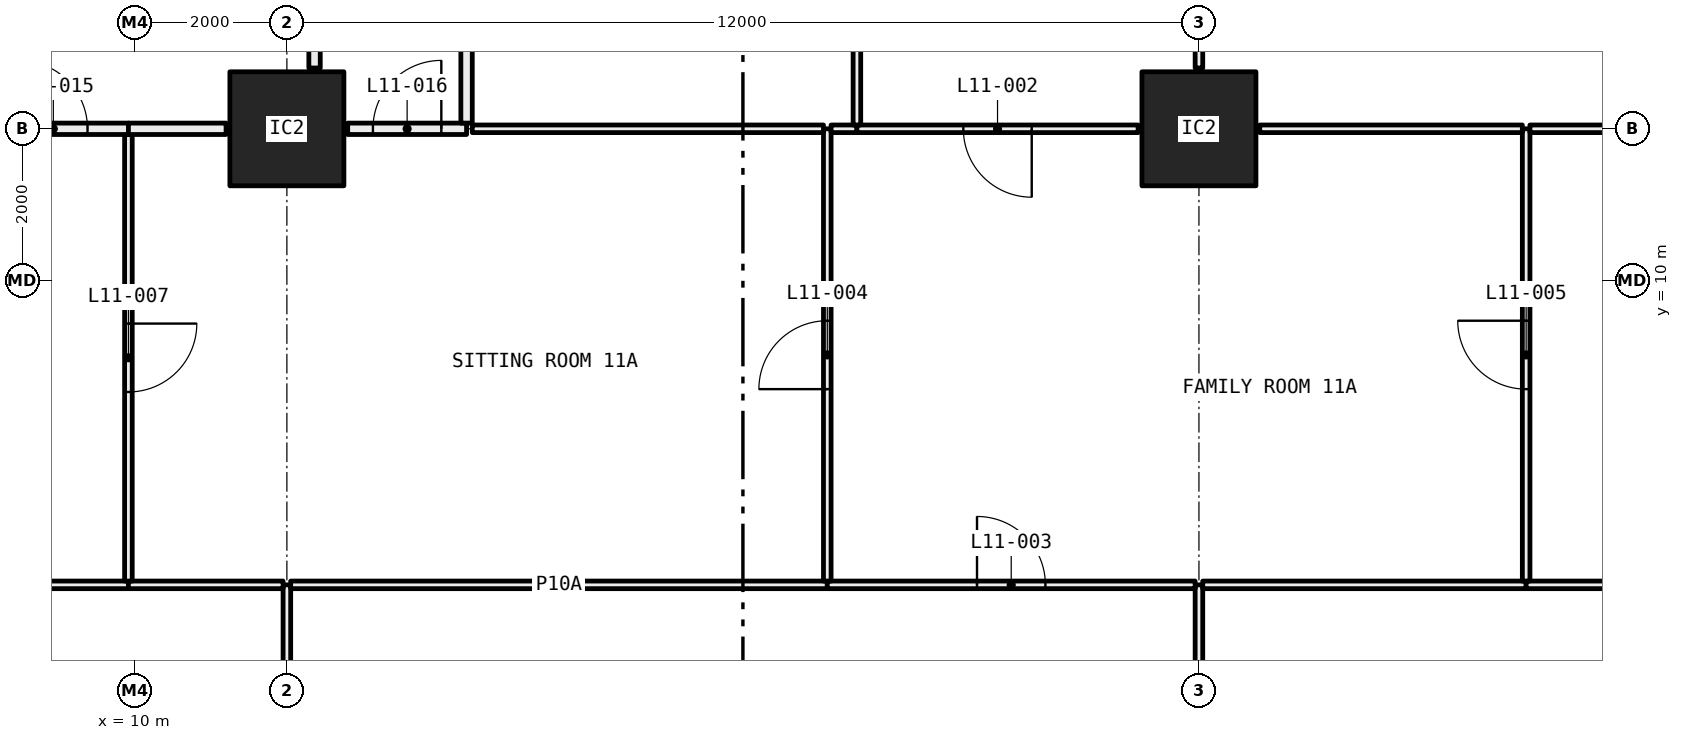
"""IFC4 building model, lengths in metres.
Left out: names, types, materials, properties, quantities, classifications, styles, units other than length and angle.
Written with IfcOpenShell. Run it as: python <this file> out.ifc"""

import sys

from ifc_helpers import new_model, si_unit, direction, frame, frame_2d, origin, origin_2d, place, context, subcontext, project, spatial, rectangle, hollow_rectangle, extrude, element, fill, save


model = new_model("IFC4")
c1 = context("Model", 3, precision=1e-05, world=origin(), true_north=direction((0.0, 1.0)))
c2 = subcontext(c1, "Body", "Model", "MODEL_VIEW")
j1 = project(units=[si_unit("LENGTHUNIT", "METRE"), si_unit("PLANEANGLEUNIT", "RADIAN")], contexts=[c1])
p1 = place(None, origin())
s1 = spatial("IfcSite", under=j1, at=p1, CompositionType="ELEMENT")
p2 = place(p1, origin())
s2 = spatial("IfcBuilding", under=s1, at=p2, CompositionType="ELEMENT")
p3 = place(p2, frame((0.0, 0.0, 50.7)))
s3 = spatial("IfcBuildingStorey", under=s2, at=p3, CompositionType="ELEMENT", Elevation=50.7)
for number, where, z_axis, x_axis in (
    (1, (12.0, 12.0, 0.0), (0.0, 0.0, 1.0), (1.0, 0.0, 0.0)),
    (2, (24.0, 12.0, 0.0), (0.0, 0.0, 1.0), (1.0, 0.0, 0.0)),
):
    element("IfcColumn", number, at=place(p3, frame(where, z_axis=z_axis, x_axis=x_axis)), inside=s3, PredefinedType="COLUMN", context=c2, shape_type="SweptSolid", body=[
        extrude(hollow_rectangle(XDim=1.5, YDim=1.5, WallThickness=0.065, at=origin_2d()), origin(), (0.0, 0.0, 1.0), 3.05),
    ])
p4 = place(p3, frame((12.0, 0.72, 0.0), z_axis=(0.0, 0.0, 1.0), x_axis=(0.0, 1.0, 0.0)))
e3 = element("IfcWall", 3, at=p4, inside=s3, PredefinedType="PARTITIONING", context=c2, shape_type="SweptSolid", body=[
    extrude(rectangle(XDim=5.28, YDim=0.1, at=frame_2d((2.64, 0.0))), origin(), (0.0, 0.0, 1.0), 2.45),
])
p5 = place(p4, frame((2.19, 0.0, 0.0)))
e4 = element("IfcOpeningElement", 4, at=p5, cuts=e3, PredefinedType="OPENING", context=c2, shape_type="SweptSolid", body=[
    extrude(rectangle(XDim=0.9, YDim=2.1, at=frame_2d((0.45, 1.05))), frame((0.0, 0.06, 0.0), z_axis=(0.0, -1.0, 0.0), x_axis=(1.0, 0.0, 0.0)), (0.0, 0.0, 1.0), 0.12),
])
p6 = place(p3, frame((9.915, 6.0, 0.0), z_axis=(0.0, 0.0, 1.0), x_axis=(-1.0, 0.0, 0.0)))
e5 = element("IfcWall", 5, at=p6, inside=s3, PredefinedType="PARTITIONING", context=c2, shape_type="SweptSolid", body=[
    extrude(rectangle(XDim=3.195, YDim=0.1, at=frame_2d((1.598, 0.0))), origin(), (0.0, 0.0, 1.0), 3.05),
])
p7 = place(p3, frame((11.95, 6.0, 0.0), z_axis=(0.0, 0.0, 1.0), x_axis=(-1.0, 0.0, 0.0)))
e6 = element("IfcWall", 6, at=p7, inside=s3, PredefinedType="PARTITIONING", context=c2, shape_type="SweptSolid", body=[
    extrude(rectangle(XDim=2.035, YDim=0.1, at=frame_2d((1.018, 0.0))), origin(), (0.0, 0.0, 1.0), 2.45),
])
p8 = place(p3, frame((24.0, 0.72, 0.0), z_axis=(0.0, 0.0, 1.0), x_axis=(0.0, 1.0, 0.0)))
e7 = element("IfcWall", 7, at=p8, inside=s3, PredefinedType="PARTITIONING", context=c2, shape_type="SweptSolid", body=[
    extrude(rectangle(XDim=5.28, YDim=0.1, at=frame_2d((2.64, 0.0))), origin(), (0.0, 0.0, 1.0), 2.45),
])
p9 = place(p8, frame((2.19, 0.0, 0.0)))
e8 = element("IfcOpeningElement", 8, at=p9, cuts=e7, PredefinedType="OPENING", context=c2, shape_type="SweptSolid", body=[
    extrude(rectangle(XDim=0.9, YDim=2.1, at=frame_2d((0.45, 1.05))), frame((0.0, 0.06, 0.0), z_axis=(0.0, -1.0, 0.0), x_axis=(1.0, 0.0, 0.0)), (0.0, 0.0, 1.0), 0.12),
])
p10 = place(p3, frame((19.11, 6.0, 0.0), z_axis=(0.0, 0.0, 1.0), x_axis=(-1.0, 0.0, 0.0)))
e9 = element("IfcWall", 9, at=p10, inside=s3, PredefinedType="PARTITIONING", context=c2, shape_type="SweptSolid", body=[
    extrude(rectangle(XDim=7.06, YDim=0.1, at=frame_2d((3.53, 0.0))), origin(), (0.0, 0.0, 1.0), 2.45),
])
p11 = place(p3, frame((23.95, 6.0, 0.0), z_axis=(0.0, 0.0, 1.0), x_axis=(-1.0, 0.0, 0.0)))
e10 = element("IfcWall", 10, at=p11, inside=s3, PredefinedType="PARTITIONING", context=c2, shape_type="SweptSolid", body=[
    extrude(rectangle(XDim=4.84, YDim=0.1, at=frame_2d((2.42, 0.0))), origin(), (0.0, 0.0, 1.0), 2.45),
])
p12 = place(p11, frame((1.97, 0.0, 0.0)))
e11 = element("IfcOpeningElement", 11, at=p12, cuts=e10, PredefinedType="OPENING", context=c2, shape_type="SweptSolid", body=[
    extrude(rectangle(XDim=0.9, YDim=2.1, at=frame_2d((0.45, 1.05))), frame((0.0, 0.06, 0.0), z_axis=(0.0, -1.0, 0.0), x_axis=(1.0, 0.0, 0.0)), (0.0, 0.0, 1.0), 0.12),
])
p13 = place(p3, frame((28.305, 6.0, 0.0), z_axis=(0.0, 0.0, 1.0), x_axis=(-1.0, 0.0, 0.0)))
e12 = element("IfcWall", 12, at=p13, inside=s3, PredefinedType="PARTITIONING", context=c2, shape_type="SweptSolid", body=[
    extrude(rectangle(XDim=4.255, YDim=0.1, at=frame_2d((2.127, 0.0))), origin(), (0.0, 0.0, 1.0), 2.45),
])
p14 = place(p3, frame((29.95, 6.0, 0.0), z_axis=(0.0, 0.0, 1.0), x_axis=(-1.0, 0.0, 0.0)))
e13 = element("IfcWall", 13, at=p14, inside=s3, PredefinedType="PARTITIONING", context=c2, shape_type="SweptSolid", body=[
    extrude(rectangle(XDim=1.645, YDim=0.1, at=frame_2d((0.823, 0.0))), origin(), (0.0, 0.0, 1.0), 3.05),
])
p15 = place(p3, frame((9.915, 6.05, 0.0), z_axis=(0.0, 0.0, 1.0), x_axis=(0.0, 1.0, 0.0)))
e14 = element("IfcWall", 14, at=p15, inside=s3, PredefinedType="PARTITIONING", context=c2, shape_type="SweptSolid", body=[
    extrude(rectangle(XDim=5.875, YDim=0.1, at=frame_2d((2.938, 0.0))), origin(), (0.0, 0.0, 1.0), 2.45),
])
p16 = place(p15, frame((2.488, 0.0, 0.0)))
e15 = element("IfcOpeningElement", 15, at=p16, cuts=e14, PredefinedType="OPENING", context=c2, shape_type="SweptSolid", body=[
    extrude(rectangle(XDim=0.9, YDim=2.1, at=frame_2d((0.45, 1.05))), frame((0.0, 0.06, 0.0), z_axis=(0.0, -1.0, 0.0), x_axis=(1.0, 0.0, 0.0)), (0.0, 0.0, 1.0), 0.12),
])
p17 = place(p3, frame((9.915, 12.0, 0.0), z_axis=(0.0, 0.0, 1.0), x_axis=(-1.0, 0.0, 0.0)))
e16 = element("IfcWall", 16, at=p17, inside=s3, PredefinedType="PARTITIONING", context=c2, shape_type="SweptSolid", body=[
    extrude(rectangle(XDim=1.976, YDim=0.15, at=frame_2d((0.988, 0.0))), origin(), (0.0, 0.0, 1.0), 2.45),
])
p18 = place(p17, frame((0.538, 0.0, 0.0)))
e17 = element("IfcOpeningElement", 17, at=p18, cuts=e16, PredefinedType="OPENING", context=c2, shape_type="SweptSolid", body=[
    extrude(rectangle(XDim=0.9, YDim=2.1, at=frame_2d((0.45, 1.05))), frame((0.0, 0.085, 0.0), z_axis=(0.0, -1.0, 0.0), x_axis=(1.0, 0.0, 0.0)), (0.0, 0.0, 1.0), 0.17),
])
p19 = place(p3, frame((19.11, 6.05, 0.0), z_axis=(0.0, 0.0, 1.0), x_axis=(0.0, 1.0, 0.0)))
e18 = element("IfcWall", 18, at=p19, inside=s3, PredefinedType="PARTITIONING", context=c2, shape_type="SweptSolid", body=[
    extrude(rectangle(XDim=5.95, YDim=0.1, at=frame_2d((2.975, 0.0))), origin(), (0.0, 0.0, 1.0), 2.45),
])
p20 = place(p19, frame((2.525, 0.0, 0.0)))
e19 = element("IfcOpeningElement", 19, at=p20, cuts=e18, PredefinedType="OPENING", context=c2, shape_type="SweptSolid", body=[
    extrude(rectangle(XDim=0.9, YDim=2.1, at=frame_2d((0.45, 1.05))), frame((0.0, 0.06, 0.0), z_axis=(0.0, -1.0, 0.0), x_axis=(1.0, 0.0, 0.0)), (0.0, 0.0, 1.0), 0.12),
])
p21 = place(p3, frame((11.2, 12.0, 0.0), z_axis=(0.0, 0.0, 1.0), x_axis=(-1.0, 0.0, 0.0)))
e20 = element("IfcWall", 20, at=p21, inside=s3, PredefinedType="PARTITIONING", context=c2, shape_type="SweptSolid", body=[
    extrude(rectangle(XDim=1.285, YDim=0.15, at=frame_2d((0.643, 0.0))), origin(), (0.0, 0.0, 1.0), 2.45),
])
p22 = place(p3, frame((14.364, 12.0, 0.0), z_axis=(0.0, 0.0, 1.0), x_axis=(-1.0, 0.0, 0.0)))
e21 = element("IfcWall", 21, at=p22, inside=s3, PredefinedType="PARTITIONING", context=c2, shape_type="SweptSolid", body=[
    extrude(rectangle(XDim=1.564, YDim=0.15, at=frame_2d((0.782, 0.0))), origin(), (0.0, 0.0, 1.0), 2.45),
])
p23 = place(p22, frame((0.332, 0.0, 0.0)))
e22 = element("IfcOpeningElement", 22, at=p23, cuts=e21, PredefinedType="OPENING", context=c2, shape_type="SweptSolid", body=[
    extrude(rectangle(XDim=0.9, YDim=2.1, at=frame_2d((0.45, 1.05))), frame((0.0, 0.085, 0.0), z_axis=(0.0, -1.0, 0.0), x_axis=(1.0, 0.0, 0.0)), (0.0, 0.0, 1.0), 0.17),
])
p24 = place(p3, frame((19.06, 12.0, 0.0), z_axis=(0.0, 0.0, 1.0), x_axis=(-1.0, 0.0, 0.0)))
e23 = element("IfcWall", 23, at=p24, inside=s3, PredefinedType="PARTITIONING", context=c2, shape_type="SweptSolid", body=[
    extrude(rectangle(XDim=4.621, YDim=0.1, at=frame_2d((2.311, 0.0))), origin(), (0.0, 0.0, 1.0), 2.45),
])
p25 = place(p3, frame((28.305, 6.05, 0.0), z_axis=(0.0, 0.0, 1.0), x_axis=(0.0, 1.0, 0.0)))
e24 = element("IfcWall", 24, at=p25, inside=s3, PredefinedType="PARTITIONING", context=c2, shape_type="SweptSolid", body=[
    extrude(rectangle(XDim=5.95, YDim=0.1, at=frame_2d((2.975, 0.0))), origin(), (0.0, 0.0, 1.0), 2.45),
])
p26 = place(p25, frame((2.525, 0.0, 0.0)))
e25 = element("IfcOpeningElement", 25, at=p26, cuts=e24, PredefinedType="OPENING", context=c2, shape_type="SweptSolid", body=[
    extrude(rectangle(XDim=0.9, YDim=2.1, at=frame_2d((0.45, 1.05))), frame((0.0, 0.06, 0.0), z_axis=(0.0, -1.0, 0.0), x_axis=(1.0, 0.0, 0.0)), (0.0, 0.0, 1.0), 0.12),
])
p27 = place(p3, frame((19.5, 12.0, 0.0), z_axis=(0.0, 0.0, 1.0), x_axis=(-1.0, 0.0, 0.0)))
e26 = element("IfcWall", 26, at=p27, inside=s3, PredefinedType="PARTITIONING", context=c2, shape_type="SweptSolid", body=[
    extrude(rectangle(XDim=0.34, YDim=0.1, at=frame_2d((0.17, 0.0))), origin(), (0.0, 0.0, 1.0), 2.45),
])
p28 = place(p3, frame((23.2, 12.0, 0.0), z_axis=(0.0, 0.0, 1.0), x_axis=(-1.0, 0.0, 0.0)))
e27 = element("IfcWall", 27, at=p28, inside=s3, PredefinedType="PARTITIONING", context=c2, shape_type="SweptSolid", body=[
    extrude(rectangle(XDim=3.7, YDim=0.1, at=frame_2d((1.85, 0.0))), origin(), (0.0, 0.0, 1.0), 2.45),
])
p29 = place(p28, frame((1.4, 0.0, 0.0)))
e28 = element("IfcOpeningElement", 28, at=p29, cuts=e27, PredefinedType="OPENING", context=c2, shape_type="SweptSolid", body=[
    extrude(rectangle(XDim=0.9, YDim=2.1, at=frame_2d((0.45, 1.05))), frame((0.0, 0.06, 0.0), z_axis=(0.0, -1.0, 0.0), x_axis=(1.0, 0.0, 0.0)), (0.0, 0.0, 1.0), 0.12),
])
p30 = place(p3, frame((28.255, 12.0, 0.0), z_axis=(0.0, 0.0, 1.0), x_axis=(-1.0, 0.0, 0.0)))
e29 = element("IfcWall", 29, at=p30, inside=s3, PredefinedType="PARTITIONING", context=c2, shape_type="SweptSolid", body=[
    extrude(rectangle(XDim=3.455, YDim=0.1, at=frame_2d((1.728, 0.0))), origin(), (0.0, 0.0, 1.0), 2.45),
])
p31 = place(p3, frame((33.0, 12.0, 0.0), z_axis=(0.0, 0.0, 1.0), x_axis=(-1.0, 0.0, 0.0)))
e30 = element("IfcWall", 30, at=p31, inside=s3, PredefinedType="PARTITIONING", context=c2, shape_type="SweptSolid", body=[
    extrude(rectangle(XDim=4.645, YDim=0.1, at=frame_2d((2.323, 0.0))), origin(), (0.0, 0.0, 1.0), 2.45),
])
p32 = place(p3, frame((12.364, 12.8, 0.0), z_axis=(0.0, 0.0, 1.0), x_axis=(0.0, 1.0, 0.0)))
e31 = element("IfcWall", 31, at=p32, inside=s3, PredefinedType="PARTITIONING", context=c2, shape_type="SweptSolid", body=[
    extrude(rectangle(XDim=1.837, YDim=0.15, at=frame_2d((0.918, 0.0))), origin(), (0.0, 0.0, 1.0), 3.05),
])
p33 = place(p3, frame((14.364, 12.075, 0.0), z_axis=(0.0, 0.0, 1.0), x_axis=(0.0, 1.0, 0.0)))
e32 = element("IfcWall", 32, at=p33, inside=s3, PredefinedType="PARTITIONING", context=c2, shape_type="SweptSolid", body=[
    extrude(rectangle(XDim=5.825, YDim=0.15, at=frame_2d((2.913, 0.0))), origin(), (0.0, 0.0, 1.0), 2.45),
])
p34 = place(p3, frame((19.5, 12.05, 0.0), z_axis=(0.0, 0.0, 1.0), x_axis=(0.0, 1.0, 0.0)))
e33 = element("IfcWall", 33, at=p34, inside=s3, PredefinedType="PARTITIONING", context=c2, shape_type="SweptSolid", body=[
    extrude(rectangle(XDim=5.85, YDim=0.1, at=frame_2d((2.925, 0.0))), origin(), (0.0, 0.0, 1.0), 2.45),
])
p35 = place(p34, frame((2.475, 0.0, 0.0)))
e34 = element("IfcOpeningElement", 34, at=p35, cuts=e33, PredefinedType="OPENING", context=c2, shape_type="SweptSolid", body=[
    extrude(rectangle(XDim=0.9, YDim=2.1, at=frame_2d((0.45, 1.05))), frame((0.0, 0.06, 0.0), z_axis=(0.0, -1.0, 0.0), x_axis=(1.0, 0.0, 0.0)), (0.0, 0.0, 1.0), 0.12),
])
p36 = place(p3, frame((24.0, 12.8, 0.0), z_axis=(0.0, 0.0, 1.0), x_axis=(0.0, 1.0, 0.0)))
e35 = element("IfcWall", 35, at=p36, inside=s3, PredefinedType="PARTITIONING", context=c2, shape_type="SweptSolid", body=[
    extrude(rectangle(XDim=5.1, YDim=0.1, at=frame_2d((2.55, 0.0))), origin(), (0.0, 0.0, 1.0), 3.05),
])
p37 = place(p36, frame((2.1, 0.0, 0.0)))
e36 = element("IfcOpeningElement", 36, at=p37, cuts=e35, PredefinedType="OPENING", context=c2, shape_type="SweptSolid", body=[
    extrude(rectangle(XDim=0.9, YDim=2.1, at=frame_2d((0.45, 1.05))), frame((0.0, 0.06, 0.0), z_axis=(0.0, -1.0, 0.0), x_axis=(1.0, 0.0, 0.0)), (0.0, 0.0, 1.0), 0.12),
])
p38 = place(p29, origin())
e37 = element("IfcDoor", 37, at=p38, inside=s3, OperationType="SINGLE_SWING_RIGHT", PredefinedType="DOOR", context=c2, shape_type="SweptSolid", body=[
    extrude(rectangle(XDim=0.9, YDim=2.1, at=frame_2d((0.45, 1.05))), frame((0.0, 0.025, 0.0), z_axis=(0.0, -1.0, 0.0), x_axis=(1.0, 0.0, 0.0)), (0.0, 0.0, 1.0), 0.05),
])
fill(e28, e37)
p39 = place(p12, frame((0.9, 0.0, 0.0), x_axis=(-1.0, 0.0, 0.0)))
e38 = element("IfcDoor", 38, at=p39, inside=s3, OperationType="SINGLE_SWING_RIGHT", PredefinedType="DOOR", context=c2, shape_type="SweptSolid", body=[
    extrude(rectangle(XDim=0.9, YDim=2.1, at=frame_2d((0.45, 1.05))), frame((0.0, 0.025, 0.0), z_axis=(0.0, -1.0, 0.0), x_axis=(1.0, 0.0, 0.0)), (0.0, 0.0, 1.0), 0.05),
])
fill(e11, e38)
p40 = place(p20, origin())
e39 = element("IfcDoor", 39, at=p40, inside=s3, OperationType="SINGLE_SWING_RIGHT", PredefinedType="DOOR", context=c2, shape_type="SweptSolid", body=[
    extrude(rectangle(XDim=0.9, YDim=2.1, at=frame_2d((0.45, 1.05))), frame((0.0, 0.025, 0.0), z_axis=(0.0, -1.0, 0.0), x_axis=(1.0, 0.0, 0.0)), (0.0, 0.0, 1.0), 0.05),
])
fill(e19, e39)
p41 = place(p26, origin())
e40 = element("IfcDoor", 40, at=p41, inside=s3, OperationType="SINGLE_SWING_LEFT", PredefinedType="DOOR", context=c2, shape_type="SweptSolid", body=[
    extrude(rectangle(XDim=0.9, YDim=2.1, at=frame_2d((0.45, 1.05))), frame((0.0, 0.025, 0.0), z_axis=(0.0, -1.0, 0.0), x_axis=(1.0, 0.0, 0.0)), (0.0, 0.0, 1.0), 0.05),
])
fill(e25, e40)
p42 = place(p16, frame((0.9, 0.0, 0.0), x_axis=(-1.0, 0.0, 0.0)))
e41 = element("IfcDoor", 41, at=p42, inside=s3, OperationType="SINGLE_SWING_RIGHT", PredefinedType="DOOR", context=c2, shape_type="SweptSolid", body=[
    extrude(rectangle(XDim=0.9, YDim=2.1, at=frame_2d((0.45, 1.05))), frame((0.0, 0.025, 0.0), z_axis=(0.0, -1.0, 0.0), x_axis=(1.0, 0.0, 0.0)), (0.0, 0.0, 1.0), 0.05),
])
fill(e15, e41)
p43 = place(p18, frame((0.9, 0.0, 0.0), x_axis=(-1.0, 0.0, 0.0)))
e42 = element("IfcDoor", 42, at=p43, inside=s3, OperationType="SINGLE_SWING_RIGHT", PredefinedType="DOOR", context=c2, shape_type="SweptSolid", body=[
    extrude(rectangle(XDim=0.9, YDim=2.1, at=frame_2d((0.45, 1.05))), frame((0.0, 0.025, 0.0), z_axis=(0.0, -1.0, 0.0), x_axis=(1.0, 0.0, 0.0)), (0.0, 0.0, 1.0), 0.05),
])
fill(e17, e42)
p44 = place(p23, frame((0.9, 0.0, 0.0), x_axis=(-1.0, 0.0, 0.0)))
e43 = element("IfcDoor", 43, at=p44, inside=s3, OperationType="SINGLE_SWING_LEFT", PredefinedType="DOOR", context=c2, shape_type="SweptSolid", body=[
    extrude(rectangle(XDim=0.9, YDim=2.1, at=frame_2d((0.45, 1.05))), frame((0.0, 0.025, 0.0), z_axis=(0.0, -1.0, 0.0), x_axis=(1.0, 0.0, 0.0)), (0.0, 0.0, 1.0), 0.05),
])
fill(e22, e43)
save(model, sys.argv[1])
